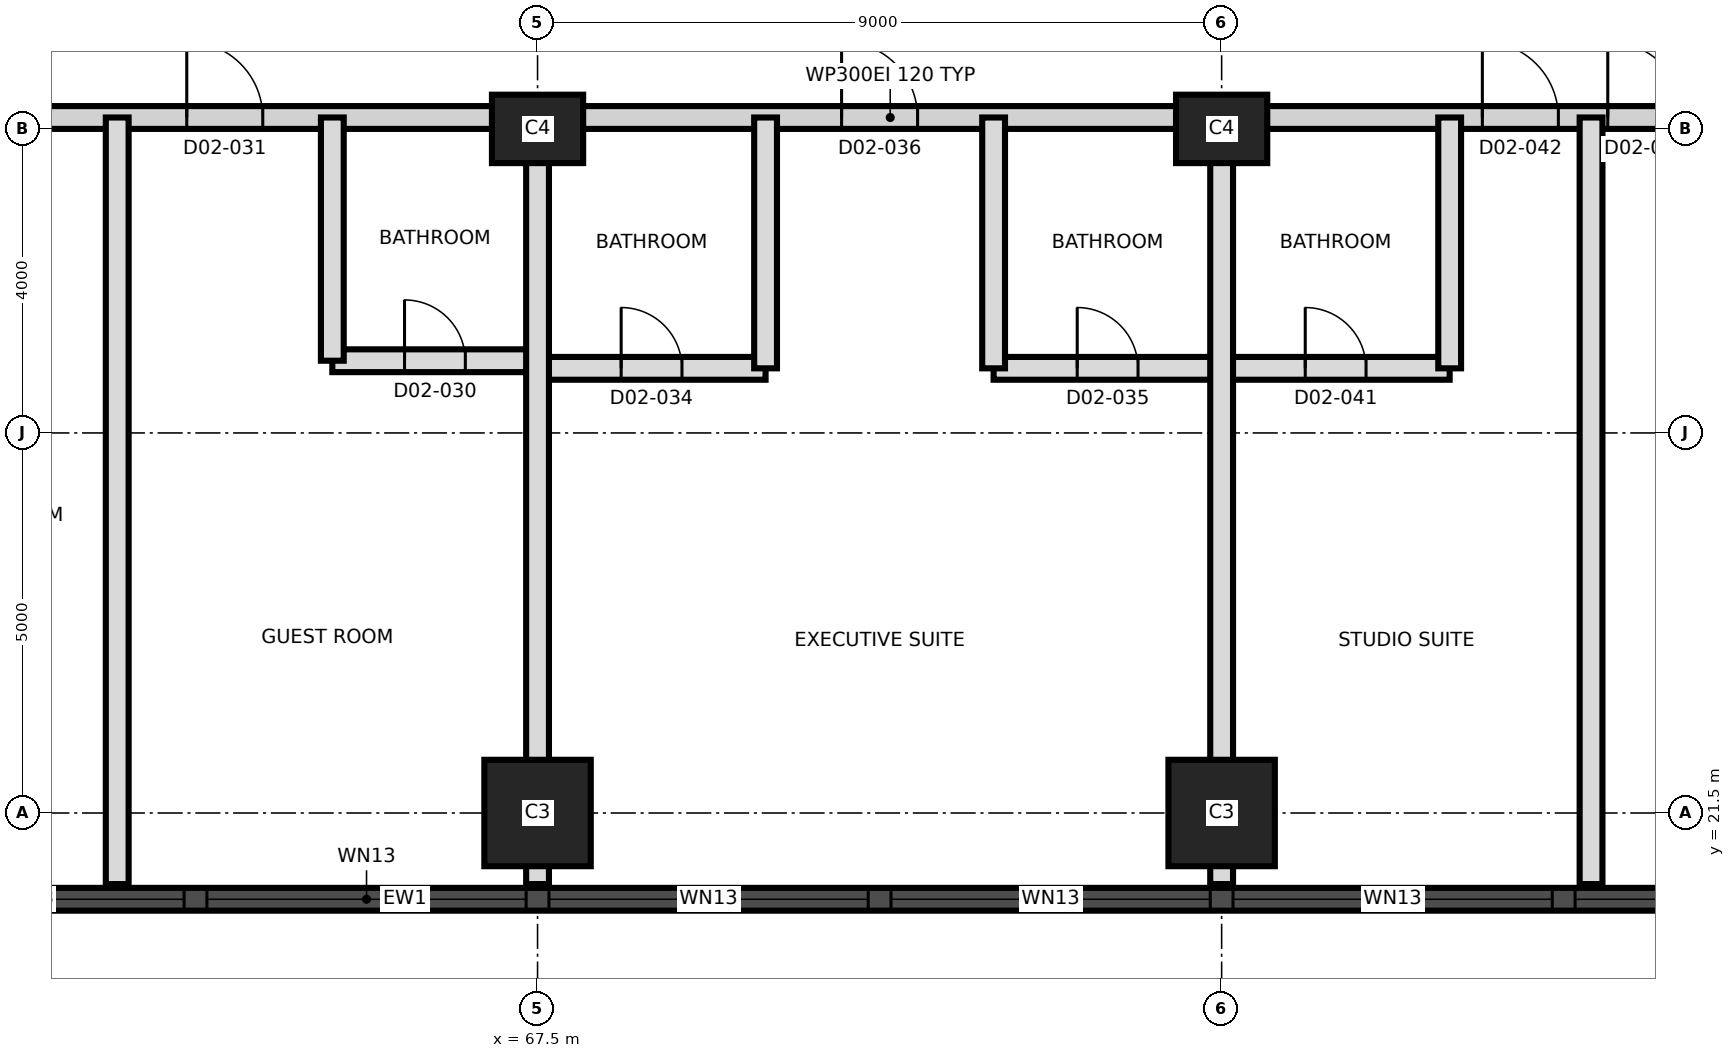
"""IFC4 building model, lengths in metres.
Left out: names, types, materials, properties, quantities, classifications, styles, units other than length and angle.
Written with IfcOpenShell. Run it as: python <this file> out.ifc"""

import sys

from ifc_helpers import new_model, si_unit, direction, frame, frame_2d, origin, origin_2d, place, context, subcontext, project, spatial, rectangle, extrude, element, fill, save


model = new_model("IFC4")
c1 = context("Model", 3, precision=1e-05, world=origin(), true_north=direction((0.0, 1.0)))
c2 = subcontext(c1, "Body", "Model", "MODEL_VIEW")
j1 = project(units=[si_unit("LENGTHUNIT", "METRE"), si_unit("PLANEANGLEUNIT", "RADIAN")], contexts=[c1])
p1 = place(None, origin())
s1 = spatial("IfcSite", under=j1, at=p1, CompositionType="ELEMENT")
p2 = place(p1, origin())
s2 = spatial("IfcBuilding", under=s1, at=p2, CompositionType="ELEMENT")
p3 = place(p2, frame((0.0, 0.0, 48.3)))
s3 = spatial("IfcBuildingStorey", under=s2, at=p3, CompositionType="ELEMENT", Elevation=48.3)
for number, where, z_axis, x_axis in (
    (1, (67.5, 21.5, 0.0), (0.0, 0.0, 1.0), (1.0, 0.0, 0.0)),
    (2, (76.5, 21.5, 0.0), (0.0, 0.0, 1.0), (1.0, 0.0, 0.0)),
):
    element("IfcColumn", number, at=place(p3, frame(where, z_axis=z_axis, x_axis=x_axis)), inside=s3, PredefinedType="COLUMN", context=c2, shape_type="SweptSolid", body=[
        extrude(rectangle(XDim=1.4, YDim=1.4, at=origin_2d()), origin(), (0.0, 0.0, 1.0), 3.7),
    ])
for number, where, z_axis, x_axis in (
    (3, (67.5, 30.5, 0.0), (0.0, 0.0, 1.0), (1.0, 0.0, 0.0)),
    (4, (76.5, 30.5, 0.0), (0.0, 0.0, 1.0), (1.0, 0.0, 0.0)),
):
    element("IfcColumn", number, at=place(p3, frame(where, z_axis=z_axis, x_axis=x_axis)), inside=s3, PredefinedType="COLUMN", context=c2, shape_type="SweptSolid", body=[
        extrude(rectangle(XDim=1.2, YDim=0.9, at=origin_2d()), origin(), (0.0, 0.0, 1.0), 3.7),
    ])
p4 = place(p3, frame((44.021, 20.365, 0.0), z_axis=(0.0, 0.0, 1.0), x_axis=(1.0, 0.0, 0.0)))
e5 = element("IfcWall", 5, at=p4, inside=s3, PredefinedType="SOLIDWALL", context=c2, shape_type="SweptSolid", body=[
    extrude(rectangle(XDim=43.466, YDim=0.3, at=frame_2d((21.733, 0.0))), origin(), (0.0, 0.0, 1.0), 3.4),
])
p5 = place(p4, frame((1.84, 0.0, 0.3)))
e6 = element("IfcOpeningElement", 6, at=p5, cuts=e5, PredefinedType="OPENING", context=c2, shape_type="SweptSolid", body=[
    extrude(rectangle(XDim=1.8, YDim=2.4, at=frame_2d((0.9, 1.2))), frame((0.0, 0.16, 0.0), z_axis=(0.0, -1.0, 0.0), x_axis=(1.0, 0.0, 0.0)), (0.0, 0.0, 1.0), 0.32),
])
p6 = place(p4, frame((5.63, 0.0, 0.9)))
e7 = element("IfcOpeningElement", 7, at=p6, cuts=e5, PredefinedType="OPENING", context=c2, shape_type="SweptSolid", body=[
    extrude(rectangle(XDim=4.2, YDim=1.7, at=frame_2d((2.1, 0.85))), frame((0.0, 0.16, 0.0), z_axis=(0.0, -1.0, 0.0), x_axis=(1.0, 0.0, 0.0)), (0.0, 0.0, 1.0), 0.32),
])
p7 = place(p4, frame((10.13, 0.0, 0.9)))
e8 = element("IfcOpeningElement", 8, at=p7, cuts=e5, PredefinedType="OPENING", context=c2, shape_type="SweptSolid", body=[
    extrude(rectangle(XDim=4.2, YDim=1.7, at=frame_2d((2.1, 0.85))), frame((0.0, 0.16, 0.0), z_axis=(0.0, -1.0, 0.0), x_axis=(1.0, 0.0, 0.0)), (0.0, 0.0, 1.0), 0.32),
])
p8 = place(p4, frame((14.63, 0.0, 0.9)))
e9 = element("IfcOpeningElement", 9, at=p8, cuts=e5, PredefinedType="OPENING", context=c2, shape_type="SweptSolid", body=[
    extrude(rectangle(XDim=4.2, YDim=1.7, at=frame_2d((2.1, 0.85))), frame((0.0, 0.16, 0.0), z_axis=(0.0, -1.0, 0.0), x_axis=(1.0, 0.0, 0.0)), (0.0, 0.0, 1.0), 0.32),
])
p9 = place(p4, frame((19.13, 0.0, 0.9)))
e10 = element("IfcOpeningElement", 10, at=p9, cuts=e5, PredefinedType="OPENING", context=c2, shape_type="SweptSolid", body=[
    extrude(rectangle(XDim=4.2, YDim=1.7, at=frame_2d((2.1, 0.85))), frame((0.0, 0.16, 0.0), z_axis=(0.0, -1.0, 0.0), x_axis=(1.0, 0.0, 0.0)), (0.0, 0.0, 1.0), 0.32),
])
p10 = place(p4, frame((23.63, 0.0, 0.9)))
e11 = element("IfcOpeningElement", 11, at=p10, cuts=e5, PredefinedType="OPENING", context=c2, shape_type="SweptSolid", body=[
    extrude(rectangle(XDim=4.2, YDim=1.7, at=frame_2d((2.1, 0.85))), frame((0.0, 0.16, 0.0), z_axis=(0.0, -1.0, 0.0), x_axis=(1.0, 0.0, 0.0)), (0.0, 0.0, 1.0), 0.32),
])
p11 = place(p4, frame((28.13, 0.0, 0.9)))
e12 = element("IfcOpeningElement", 12, at=p11, cuts=e5, PredefinedType="OPENING", context=c2, shape_type="SweptSolid", body=[
    extrude(rectangle(XDim=4.2, YDim=1.7, at=frame_2d((2.1, 0.85))), frame((0.0, 0.16, 0.0), z_axis=(0.0, -1.0, 0.0), x_axis=(1.0, 0.0, 0.0)), (0.0, 0.0, 1.0), 0.32),
])
p12 = place(p4, frame((32.63, 0.0, 0.9)))
e13 = element("IfcOpeningElement", 13, at=p12, cuts=e5, PredefinedType="OPENING", context=c2, shape_type="SweptSolid", body=[
    extrude(rectangle(XDim=4.2, YDim=1.7, at=frame_2d((2.1, 0.85))), frame((0.0, 0.16, 0.0), z_axis=(0.0, -1.0, 0.0), x_axis=(1.0, 0.0, 0.0)), (0.0, 0.0, 1.0), 0.32),
])
p13 = place(p4, frame((37.13, 0.0, 0.9)))
e14 = element("IfcOpeningElement", 14, at=p13, cuts=e5, PredefinedType="OPENING", context=c2, shape_type="SweptSolid", body=[
    extrude(rectangle(XDim=4.2, YDim=1.7, at=frame_2d((2.1, 0.85))), frame((0.0, 0.16, 0.0), z_axis=(0.0, -1.0, 0.0), x_axis=(1.0, 0.0, 0.0)), (0.0, 0.0, 1.0), 0.32),
])
p14 = place(p3, frame((67.5, 27.35, 0.0), z_axis=(0.0, 0.0, 1.0), x_axis=(1.0, 0.0, 0.0)))
e15 = element("IfcWall", 15, at=p14, inside=s3, PredefinedType="PARTITIONING", context=c2, shape_type="SweptSolid", body=[
    extrude(rectangle(XDim=3.0, YDim=0.3, at=frame_2d((1.5, 0.0))), origin(), (0.0, 0.0, 1.0), 3.4),
])
p15 = place(p14, frame((1.1, 0.0, 0.0)))
e16 = element("IfcOpeningElement", 16, at=p15, cuts=e15, PredefinedType="OPENING", context=c2, shape_type="SweptSolid", body=[
    extrude(rectangle(XDim=0.8, YDim=2.1, at=frame_2d((0.4, 1.05))), frame((0.0, 0.16, 0.0), z_axis=(0.0, -1.0, 0.0), x_axis=(1.0, 0.0, 0.0)), (0.0, 0.0, 1.0), 0.32),
])
p16 = place(p3, frame((73.5, 27.35, 0.0), z_axis=(0.0, 0.0, 1.0), x_axis=(1.0, 0.0, 0.0)))
e17 = element("IfcWall", 17, at=p16, inside=s3, PredefinedType="PARTITIONING", context=c2, shape_type="SweptSolid", body=[
    extrude(rectangle(XDim=6.0, YDim=0.3, at=frame_2d((3.0, 0.0))), origin(), (0.0, 0.0, 1.0), 3.4),
])
p17 = place(p16, frame((1.1, 0.0, 0.0)))
e18 = element("IfcOpeningElement", 18, at=p17, cuts=e17, PredefinedType="OPENING", context=c2, shape_type="SweptSolid", body=[
    extrude(rectangle(XDim=0.8, YDim=2.1, at=frame_2d((0.4, 1.05))), frame((0.0, 0.16, 0.0), z_axis=(0.0, -1.0, 0.0), x_axis=(1.0, 0.0, 0.0)), (0.0, 0.0, 1.0), 0.32),
])
p18 = place(p16, frame((4.1, 0.0, 0.0)))
e19 = element("IfcOpeningElement", 19, at=p18, cuts=e17, PredefinedType="OPENING", context=c2, shape_type="SweptSolid", body=[
    extrude(rectangle(XDim=0.8, YDim=2.1, at=frame_2d((0.4, 1.05))), frame((0.0, 0.16, 0.0), z_axis=(0.0, -1.0, 0.0), x_axis=(1.0, 0.0, 0.0)), (0.0, 0.0, 1.0), 0.32),
])
p19 = place(p3, frame((64.8, 27.45, 0.0), z_axis=(0.0, 0.0, 1.0), x_axis=(1.0, 0.0, 0.0)))
e20 = element("IfcWall", 20, at=p19, inside=s3, PredefinedType="PARTITIONING", context=c2, shape_type="SweptSolid", body=[
    extrude(rectangle(XDim=2.7, YDim=0.3, at=frame_2d((1.35, 0.0))), origin(), (0.0, 0.0, 1.0), 3.4),
])
p20 = place(p19, frame((0.95, 0.0, 0.0)))
e21 = element("IfcOpeningElement", 21, at=p20, cuts=e20, PredefinedType="OPENING", context=c2, shape_type="SweptSolid", body=[
    extrude(rectangle(XDim=0.8, YDim=2.1, at=frame_2d((0.4, 1.05))), frame((0.0, 0.16, 0.0), z_axis=(0.0, -1.0, 0.0), x_axis=(1.0, 0.0, 0.0)), (0.0, 0.0, 1.0), 0.32),
])
p21 = place(p3, frame((58.95, 30.65, 0.0), z_axis=(0.0, 0.0, 1.0), x_axis=(1.0, 0.0, 0.0)))
e22 = element("IfcWall", 22, at=p21, inside=s3, PredefinedType="PARTITIONING", context=c2, shape_type="SweptSolid", body=[
    extrude(rectangle(XDim=26.38, YDim=0.3, at=frame_2d((13.19, 0.0))), origin(), (0.0, 0.0, 1.0), 3.4),
])
p22 = place(p21, frame((0.685, 0.0, 0.0)))
e23 = element("IfcOpeningElement", 23, at=p22, cuts=e22, PredefinedType="OPENING", context=c2, shape_type="SweptSolid", body=[
    extrude(rectangle(XDim=1.2, YDim=2.1, at=frame_2d((0.6, 1.05))), frame((0.0, 0.16, 0.0), z_axis=(0.0, -1.0, 0.0), x_axis=(1.0, 0.0, 0.0)), (0.0, 0.0, 1.0), 0.32),
])
p23 = place(p21, frame((3.935, 0.0, 0.0)))
e24 = element("IfcOpeningElement", 24, at=p23, cuts=e22, PredefinedType="OPENING", context=c2, shape_type="SweptSolid", body=[
    extrude(rectangle(XDim=1.0, YDim=2.1, at=frame_2d((0.5, 1.05))), frame((0.0, 0.16, 0.0), z_axis=(0.0, -1.0, 0.0), x_axis=(1.0, 0.0, 0.0)), (0.0, 0.0, 1.0), 0.32),
])
p24 = place(p21, frame((12.55, 0.0, 0.0)))
e25 = element("IfcOpeningElement", 25, at=p24, cuts=e22, PredefinedType="OPENING", context=c2, shape_type="SweptSolid", body=[
    extrude(rectangle(XDim=1.0, YDim=2.4, at=frame_2d((0.5, 1.2))), frame((0.0, 0.16, 0.0), z_axis=(0.0, -1.0, 0.0), x_axis=(1.0, 0.0, 0.0)), (0.0, 0.0, 1.0), 0.32),
])
p25 = place(p21, frame((20.98, 0.0, 0.0)))
e26 = element("IfcOpeningElement", 26, at=p25, cuts=e22, PredefinedType="OPENING", context=c2, shape_type="SweptSolid", body=[
    extrude(rectangle(XDim=1.0, YDim=2.4, at=frame_2d((0.5, 1.2))), frame((0.0, 0.16, 0.0), z_axis=(0.0, -1.0, 0.0), x_axis=(1.0, 0.0, 0.0)), (0.0, 0.0, 1.0), 0.32),
])
p26 = place(p21, frame((22.63, 0.0, 0.0)))
e27 = element("IfcOpeningElement", 27, at=p26, cuts=e22, PredefinedType="OPENING", context=c2, shape_type="SweptSolid", body=[
    extrude(rectangle(XDim=1.0, YDim=2.4, at=frame_2d((0.5, 1.2))), frame((0.0, 0.16, 0.0), z_axis=(0.0, -1.0, 0.0), x_axis=(1.0, 0.0, 0.0)), (0.0, 0.0, 1.0), 0.32),
])
p27 = place(p3, frame((61.97, 20.565, 0.0), z_axis=(0.0, 0.0, 1.0), x_axis=(0.0, 1.0, 0.0)))
e28 = element("IfcWall", 28, at=p27, inside=s3, PredefinedType="PARTITIONING", context=c2, shape_type="SweptSolid", body=[
    extrude(rectangle(XDim=10.085, YDim=0.3, at=frame_2d((5.042, 0.0))), origin(), (0.0, 0.0, 1.0), 3.4),
])
p28 = place(p3, frame((64.8, 27.45, 0.0), z_axis=(0.0, 0.0, 1.0), x_axis=(0.0, 1.0, 0.0)))
e29 = element("IfcWall", 29, at=p28, inside=s3, PredefinedType="PARTITIONING", context=c2, shape_type="SweptSolid", body=[
    extrude(rectangle(XDim=3.2, YDim=0.3, at=frame_2d((1.6, 0.0))), origin(), (0.0, 0.0, 1.0), 3.4),
])
p29 = place(p3, frame((67.5, 20.565, 0.0), z_axis=(0.0, 0.0, 1.0), x_axis=(0.0, 1.0, 0.0)))
e30 = element("IfcWall", 30, at=p29, inside=s3, PredefinedType="PARTITIONING", context=c2, shape_type="SweptSolid", body=[
    extrude(rectangle(XDim=10.085, YDim=0.3, at=frame_2d((5.042, 0.0))), origin(), (0.0, 0.0, 1.0), 3.4),
])
for number, where, z_axis, x_axis in (
    (31, (70.5, 27.35, 0.0), (0.0, 0.0, 1.0), (0.0, 1.0, 0.0)),
    (32, (73.5, 27.35, 0.0), (0.0, 0.0, 1.0), (0.0, 1.0, 0.0)),
):
    element("IfcWall", number, at=place(p3, frame(where, z_axis=z_axis, x_axis=x_axis)), inside=s3, PredefinedType="PARTITIONING", context=c2, shape_type="SweptSolid", body=[
        extrude(rectangle(XDim=3.3, YDim=0.3, at=frame_2d((1.65, 0.0))), origin(), (0.0, 0.0, 1.0), 3.4),
    ])
p30 = place(p3, frame((76.5, 20.565, 0.0), z_axis=(0.0, 0.0, 1.0), x_axis=(0.0, 1.0, 0.0)))
e33 = element("IfcWall", 33, at=p30, inside=s3, PredefinedType="PARTITIONING", context=c2, shape_type="SweptSolid", body=[
    extrude(rectangle(XDim=10.085, YDim=0.3, at=frame_2d((5.042, 0.0))), origin(), (0.0, 0.0, 1.0), 3.4),
])
p31 = place(p3, frame((79.5, 27.35, 0.0), z_axis=(0.0, 0.0, 1.0), x_axis=(0.0, 1.0, 0.0)))
e34 = element("IfcWall", 34, at=p31, inside=s3, PredefinedType="PARTITIONING", context=c2, shape_type="SweptSolid", body=[
    extrude(rectangle(XDim=3.3, YDim=0.3, at=frame_2d((1.65, 0.0))), origin(), (0.0, 0.0, 1.0), 3.4),
])
p32 = place(p3, frame((81.36, 20.565, 0.0), z_axis=(0.0, 0.0, 1.0), x_axis=(0.0, 1.0, 0.0)))
e35 = element("IfcWall", 35, at=p32, inside=s3, PredefinedType="PARTITIONING", context=c2, shape_type="SweptSolid", body=[
    extrude(rectangle(XDim=10.085, YDim=0.3, at=frame_2d((5.042, 0.0))), origin(), (0.0, 0.0, 1.0), 3.4),
])
p33 = place(p8, origin())
e36 = element("IfcWindow", 36, at=p33, inside=s3, PartitioningType="SINGLE_PANEL", PredefinedType="WINDOW", context=c2, shape_type="SweptSolid", body=[
    extrude(rectangle(XDim=4.2, YDim=1.7, at=frame_2d((2.1, 0.85))), frame((0.0, 0.03, 0.0), z_axis=(0.0, -1.0, 0.0), x_axis=(1.0, 0.0, 0.0)), (0.0, 0.0, 1.0), 0.06),
])
fill(e9, e36)
p34 = place(p9, origin())
e37 = element("IfcWindow", 37, at=p34, inside=s3, PartitioningType="SINGLE_PANEL", PredefinedType="WINDOW", context=c2, shape_type="SweptSolid", body=[
    extrude(rectangle(XDim=4.2, YDim=1.7, at=frame_2d((2.1, 0.85))), frame((0.0, 0.03, 0.0), z_axis=(0.0, -1.0, 0.0), x_axis=(1.0, 0.0, 0.0)), (0.0, 0.0, 1.0), 0.06),
])
fill(e10, e37)
p35 = place(p10, origin())
e38 = element("IfcWindow", 38, at=p35, inside=s3, PartitioningType="SINGLE_PANEL", PredefinedType="WINDOW", context=c2, shape_type="SweptSolid", body=[
    extrude(rectangle(XDim=4.2, YDim=1.7, at=frame_2d((2.1, 0.85))), frame((0.0, 0.03, 0.0), z_axis=(0.0, -1.0, 0.0), x_axis=(1.0, 0.0, 0.0)), (0.0, 0.0, 1.0), 0.06),
])
fill(e11, e38)
p36 = place(p11, origin())
e39 = element("IfcWindow", 39, at=p36, inside=s3, PartitioningType="SINGLE_PANEL", PredefinedType="WINDOW", context=c2, shape_type="SweptSolid", body=[
    extrude(rectangle(XDim=4.2, YDim=1.7, at=frame_2d((2.1, 0.85))), frame((0.0, 0.03, 0.0), z_axis=(0.0, -1.0, 0.0), x_axis=(1.0, 0.0, 0.0)), (0.0, 0.0, 1.0), 0.06),
])
fill(e12, e39)
p37 = place(p12, origin())
e40 = element("IfcWindow", 40, at=p37, inside=s3, PartitioningType="SINGLE_PANEL", PredefinedType="WINDOW", context=c2, shape_type="SweptSolid", body=[
    extrude(rectangle(XDim=4.2, YDim=1.7, at=frame_2d((2.1, 0.85))), frame((0.0, 0.03, 0.0), z_axis=(0.0, -1.0, 0.0), x_axis=(1.0, 0.0, 0.0)), (0.0, 0.0, 1.0), 0.06),
])
fill(e13, e40)
p38 = place(p13, origin())
e41 = element("IfcWindow", 41, at=p38, inside=s3, PartitioningType="SINGLE_PANEL", PredefinedType="WINDOW", context=c2, shape_type="SweptSolid", body=[
    extrude(rectangle(XDim=4.2, YDim=1.7, at=frame_2d((2.1, 0.85))), frame((0.0, 0.03, 0.0), z_axis=(0.0, -1.0, 0.0), x_axis=(1.0, 0.0, 0.0)), (0.0, 0.0, 1.0), 0.06),
])
fill(e14, e41)
p39 = place(p20, origin())
e42 = element("IfcDoor", 42, at=p39, inside=s3, OperationType="SINGLE_SWING_RIGHT", PredefinedType="DOOR", context=c2, shape_type="SweptSolid", body=[
    extrude(rectangle(XDim=0.8, YDim=2.1, at=frame_2d((0.4, 1.05))), frame((0.0, 0.025, 0.0), z_axis=(0.0, -1.0, 0.0), x_axis=(1.0, 0.0, 0.0)), (0.0, 0.0, 1.0), 0.05),
])
fill(e21, e42)
p40 = place(p23, origin())
e43 = element("IfcDoor", 43, at=p40, inside=s3, OperationType="SINGLE_SWING_LEFT", PredefinedType="DOOR", context=c2, shape_type="SweptSolid", body=[
    extrude(rectangle(XDim=1.0, YDim=2.1, at=frame_2d((0.5, 1.05))), frame((0.0, 0.025, 0.0), z_axis=(0.0, -1.0, 0.0), x_axis=(1.0, 0.0, 0.0)), (0.0, 0.0, 1.0), 0.05),
])
fill(e24, e43)
p41 = place(p15, origin())
e44 = element("IfcDoor", 44, at=p41, inside=s3, OperationType="SINGLE_SWING_LEFT", PredefinedType="DOOR", context=c2, shape_type="SweptSolid", body=[
    extrude(rectangle(XDim=0.8, YDim=2.1, at=frame_2d((0.4, 1.05))), frame((0.0, 0.025, 0.0), z_axis=(0.0, -1.0, 0.0), x_axis=(1.0, 0.0, 0.0)), (0.0, 0.0, 1.0), 0.05),
])
fill(e16, e44)
p42 = place(p17, origin())
e45 = element("IfcDoor", 45, at=p42, inside=s3, OperationType="SINGLE_SWING_LEFT", PredefinedType="DOOR", context=c2, shape_type="SweptSolid", body=[
    extrude(rectangle(XDim=0.8, YDim=2.1, at=frame_2d((0.4, 1.05))), frame((0.0, 0.025, 0.0), z_axis=(0.0, -1.0, 0.0), x_axis=(1.0, 0.0, 0.0)), (0.0, 0.0, 1.0), 0.05),
])
fill(e18, e45)
p43 = place(p24, origin())
e46 = element("IfcDoor", 46, at=p43, inside=s3, OperationType="SINGLE_SWING_RIGHT", PredefinedType="DOOR", context=c2, shape_type="SweptSolid", body=[
    extrude(rectangle(XDim=1.0, YDim=2.4, at=frame_2d((0.5, 1.2))), frame((0.0, 0.025, 0.0), z_axis=(0.0, -1.0, 0.0), x_axis=(1.0, 0.0, 0.0)), (0.0, 0.0, 1.0), 0.05),
])
fill(e25, e46)
p44 = place(p18, origin())
e47 = element("IfcDoor", 47, at=p44, inside=s3, OperationType="SINGLE_SWING_LEFT", PredefinedType="DOOR", context=c2, shape_type="SweptSolid", body=[
    extrude(rectangle(XDim=0.8, YDim=2.1, at=frame_2d((0.4, 1.05))), frame((0.0, 0.025, 0.0), z_axis=(0.0, -1.0, 0.0), x_axis=(1.0, 0.0, 0.0)), (0.0, 0.0, 1.0), 0.05),
])
fill(e19, e47)
p45 = place(p25, origin())
e48 = element("IfcDoor", 48, at=p45, inside=s3, OperationType="SINGLE_SWING_LEFT", PredefinedType="DOOR", context=c2, shape_type="SweptSolid", body=[
    extrude(rectangle(XDim=1.0, YDim=2.4, at=frame_2d((0.5, 1.2))), frame((0.0, 0.025, 0.0), z_axis=(0.0, -1.0, 0.0), x_axis=(1.0, 0.0, 0.0)), (0.0, 0.0, 1.0), 0.05),
])
fill(e26, e48)
p46 = place(p26, origin())
e49 = element("IfcDoor", 49, at=p46, inside=s3, OperationType="SINGLE_SWING_RIGHT", PredefinedType="DOOR", context=c2, shape_type="SweptSolid", body=[
    extrude(rectangle(XDim=1.0, YDim=2.4, at=frame_2d((0.5, 1.2))), frame((0.0, 0.025, 0.0), z_axis=(0.0, -1.0, 0.0), x_axis=(1.0, 0.0, 0.0)), (0.0, 0.0, 1.0), 0.05),
])
fill(e27, e49)
save(model, sys.argv[1])
